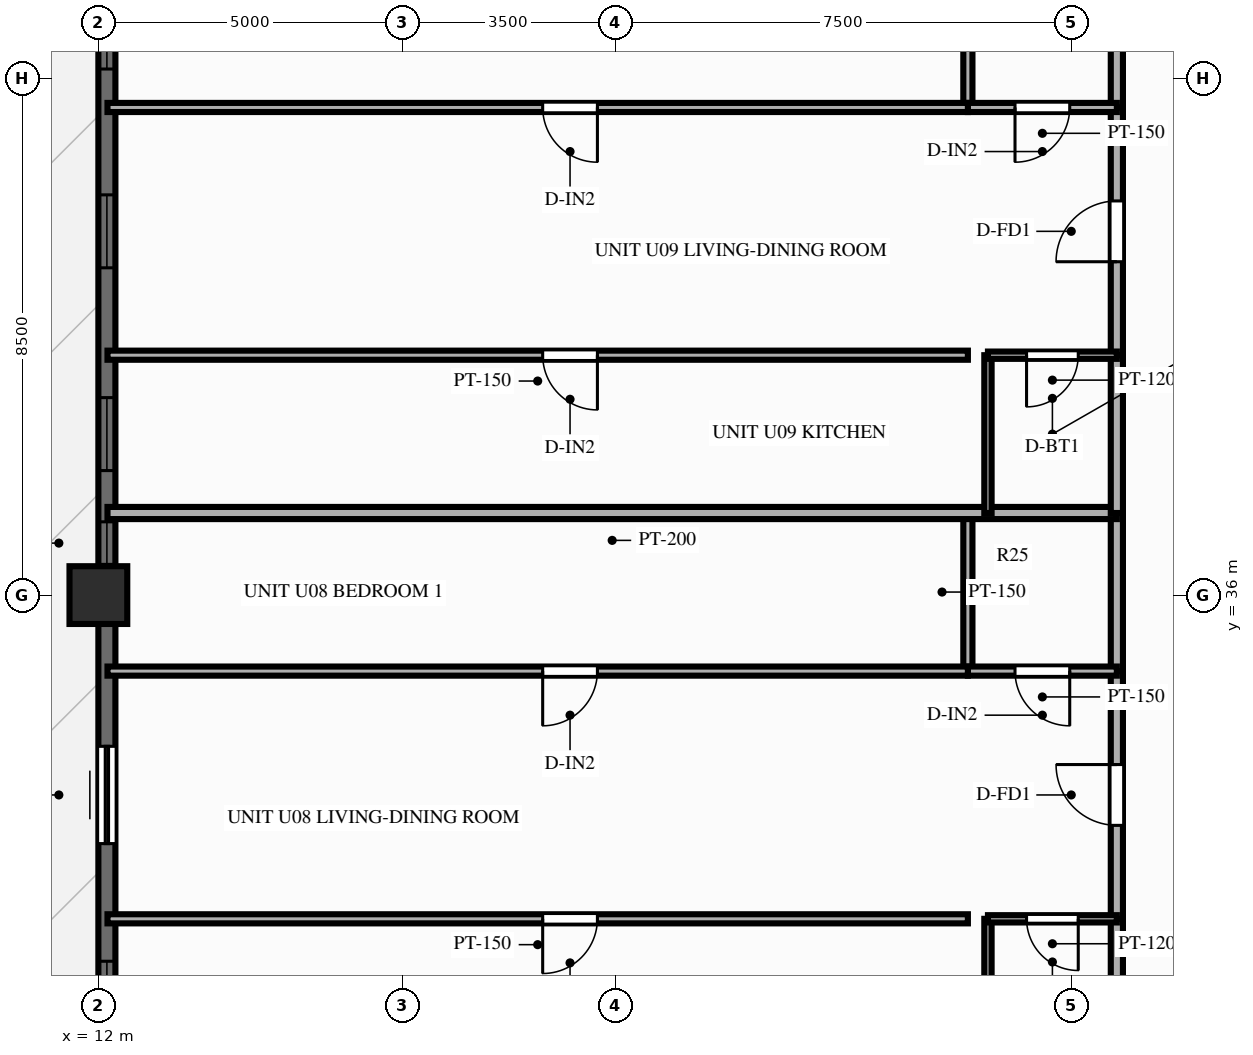
"""IFC4 building model, lengths in metres.
Left out: names, types, materials, properties, quantities, classifications, styles, units other than length and angle.
Written with IfcOpenShell. Run it as: python <this file> out.ifc"""

import sys

from ifc_helpers import new_model, si_unit, direction, frame, frame_2d, origin, origin_2d, place, context, subcontext, project, spatial, rectangle, extrude, source, transform, mapped, element, fill, save


model = new_model("IFC4")
c1 = context("Model", 3, precision=1e-05, world=origin(), true_north=direction((0.0, 1.0)))
c2 = subcontext(c1, "Body", "Model", "MODEL_VIEW")
j1 = project(units=[si_unit("LENGTHUNIT", "METRE"), si_unit("PLANEANGLEUNIT", "RADIAN")], contexts=[c1])
p1 = place(None, origin())
s1 = spatial("IfcSite", under=j1, at=p1, CompositionType="ELEMENT")
p2 = place(p1, origin())
s2 = spatial("IfcBuilding", under=s1, at=p2, CompositionType="ELEMENT")
p3 = place(p2, frame((0.0, 0.0, 110.85)))
s3 = spatial("IfcBuildingStorey", under=s2, at=p3, CompositionType="ELEMENT", Elevation=110.85)
m1 = source(origin(), c2, "Body", "SweptSolid", [
    extrude(rectangle(XDim=0.95, YDim=0.95, at=origin_2d()), origin(), (0.0, 0.0, 1.0), 3.0),
])
p4 = place(p3, frame((12.0, 36.0, 0.0), z_axis=(0.0, 0.0, 1.0), x_axis=(1.0, 0.0, 0.0)))
e1 = element("IfcColumn", 1, at=p4, inside=s3, PredefinedType="COLUMN", context=c2, shape_type="MappedRepresentation", body=[
    mapped(m1, transform((0.0, 0.0, 0.0), scale=1.0)),
])
p5 = place(p3, frame((12.14, 7.2, 0.0), z_axis=(0.0, 0.0, 1.0), x_axis=(0.0, 1.0, 0.0)))
e2 = element("IfcWall", 2, at=p5, inside=s3, PredefinedType="SOLIDWALL", context=c2, shape_type="SweptSolid", body=[
    extrude(rectangle(XDim=39.6, YDim=0.28, at=frame_2d((19.8, 0.0))), origin(), (0.0, 0.0, 1.0), 2.28),
])
p6 = place(p5, frame((0.945, 0.0, 0.25)))
e3 = element("IfcOpeningElement", 3, at=p6, cuts=e2, PredefinedType="OPENING", context=c2, shape_type="SweptSolid", body=[
    extrude(rectangle(XDim=1.2, YDim=1.5, at=frame_2d((0.6, 0.75))), frame((0.0, 0.152, 0.0), z_axis=(0.0, -1.0, 0.0), x_axis=(1.0, 0.0, 0.0)), (0.0, 0.0, 1.0), 0.304),
])
p7 = place(p5, frame((4.213, 0.0, 0.25)))
e4 = element("IfcOpeningElement", 4, at=p7, cuts=e2, PredefinedType="OPENING", context=c2, shape_type="SweptSolid", body=[
    extrude(rectangle(XDim=1.2, YDim=1.5, at=frame_2d((0.6, 0.75))), frame((0.0, 0.152, 0.0), z_axis=(0.0, -1.0, 0.0), x_axis=(1.0, 0.0, 0.0)), (0.0, 0.0, 1.0), 0.304),
])
p8 = place(p5, frame((7.55, 0.0, 0.25)))
e5 = element("IfcOpeningElement", 5, at=p8, cuts=e2, PredefinedType="OPENING", context=c2, shape_type="SweptSolid", body=[
    extrude(rectangle(XDim=1.2, YDim=1.5, at=frame_2d((0.6, 0.75))), frame((0.0, 0.152, 0.0), z_axis=(0.0, -1.0, 0.0), x_axis=(1.0, 0.0, 0.0)), (0.0, 0.0, 1.0), 0.304),
])
p9 = place(p5, frame((13.483, 0.0, 0.25)))
e6 = element("IfcOpeningElement", 6, at=p9, cuts=e2, PredefinedType="OPENING", context=c2, shape_type="SweptSolid", body=[
    extrude(rectangle(XDim=1.2, YDim=1.5, at=frame_2d((0.6, 0.75))), frame((0.0, 0.152, 0.0), z_axis=(0.0, -1.0, 0.0), x_axis=(1.0, 0.0, 0.0)), (0.0, 0.0, 1.0), 0.304),
])
p10 = place(p5, frame((16.82, 0.0, 0.25)))
e7 = element("IfcOpeningElement", 7, at=p10, cuts=e2, PredefinedType="OPENING", context=c2, shape_type="SweptSolid", body=[
    extrude(rectangle(XDim=1.2, YDim=1.5, at=frame_2d((0.6, 0.75))), frame((0.0, 0.152, 0.0), z_axis=(0.0, -1.0, 0.0), x_axis=(1.0, 0.0, 0.0)), (0.0, 0.0, 1.0), 0.304),
])
p11 = place(p5, frame((19.2, 0.0, 0.25)))
e8 = element("IfcOpeningElement", 8, at=p11, cuts=e2, PredefinedType="OPENING", context=c2, shape_type="SweptSolid", body=[
    extrude(rectangle(XDim=1.2, YDim=1.5, at=frame_2d((0.6, 0.75))), frame((0.0, 0.152, 0.0), z_axis=(0.0, -1.0, 0.0), x_axis=(1.0, 0.0, 0.0)), (0.0, 0.0, 1.0), 0.304),
])
p12 = place(p5, frame((21.578, 0.0, 0.25)))
e9 = element("IfcOpeningElement", 9, at=p12, cuts=e2, PredefinedType="OPENING", context=c2, shape_type="SweptSolid", body=[
    extrude(rectangle(XDim=1.2, YDim=1.5, at=frame_2d((0.6, 0.75))), frame((0.0, 0.152, 0.0), z_axis=(0.0, -1.0, 0.0), x_axis=(1.0, 0.0, 0.0)), (0.0, 0.0, 1.0), 0.304),
])
p13 = place(p5, frame((24.713, 0.0, 0.0)))
e10 = element("IfcOpeningElement", 10, at=p13, cuts=e2, PredefinedType="OPENING", context=c2, shape_type="SweptSolid", body=[
    extrude(rectangle(XDim=1.6, YDim=2.15, at=frame_2d((0.8, 1.075))), frame((0.0, 0.152, 0.0), z_axis=(0.0, -1.0, 0.0), x_axis=(1.0, 0.0, 0.0)), (0.0, 0.0, 1.0), 0.304),
])
p14 = place(p5, frame((29.305, 0.0, 0.25)))
e11 = element("IfcOpeningElement", 11, at=p14, cuts=e2, PredefinedType="OPENING", context=c2, shape_type="SweptSolid", body=[
    extrude(rectangle(XDim=0.7, YDim=1.5, at=frame_2d((0.35, 0.75))), frame((0.0, 0.152, 0.0), z_axis=(0.0, -1.0, 0.0), x_axis=(1.0, 0.0, 0.0)), (0.0, 0.0, 1.0), 0.304),
])
p15 = place(p5, frame((30.848, 0.0, 0.25)))
e12 = element("IfcOpeningElement", 12, at=p15, cuts=e2, PredefinedType="OPENING", context=c2, shape_type="SweptSolid", body=[
    extrude(rectangle(XDim=1.2, YDim=1.5, at=frame_2d((0.6, 0.75))), frame((0.0, 0.152, 0.0), z_axis=(0.0, -1.0, 0.0), x_axis=(1.0, 0.0, 0.0)), (0.0, 0.0, 1.0), 0.304),
])
p16 = place(p5, frame((34.183, 0.0, 0.25)))
e13 = element("IfcOpeningElement", 13, at=p16, cuts=e2, PredefinedType="OPENING", context=c2, shape_type="SweptSolid", body=[
    extrude(rectangle(XDim=1.2, YDim=1.5, at=frame_2d((0.6, 0.75))), frame((0.0, 0.152, 0.0), z_axis=(0.0, -1.0, 0.0), x_axis=(1.0, 0.0, 0.0)), (0.0, 0.0, 1.0), 0.304),
])
p17 = place(p5, frame((37.452, 0.0, 0.25)))
e14 = element("IfcOpeningElement", 14, at=p17, cuts=e2, PredefinedType="OPENING", context=c2, shape_type="SweptSolid", body=[
    extrude(rectangle(XDim=1.2, YDim=1.5, at=frame_2d((0.6, 0.75))), frame((0.0, 0.152, 0.0), z_axis=(0.0, -1.0, 0.0), x_axis=(1.0, 0.0, 0.0)), (0.0, 0.0, 1.0), 0.304),
])
p18 = place(p3, frame((28.75, 28.08, 0.0), z_axis=(0.0, 0.0, 1.0), x_axis=(0.0, 1.0, 0.0)))
e15 = element("IfcWall", 15, at=p18, inside=s3, PredefinedType="PARTITIONING", context=c2, shape_type="SweptSolid", body=[
    extrude(rectangle(XDim=2.595, YDim=0.2, at=frame_2d((1.298, 0.0))), origin(), (0.0, 0.0, 1.0), 2.79),
])
p19 = place(p3, frame((28.75, 30.676, 0.0), z_axis=(0.0, 0.0, 1.0), x_axis=(0.0, 1.0, 0.0)))
e16 = element("IfcWall", 16, at=p19, inside=s3, PredefinedType="PARTITIONING", context=c2, shape_type="SweptSolid", body=[
    extrude(rectangle(XDim=4.074, YDim=0.2, at=frame_2d((2.037, 0.0))), origin(), (0.0, 0.0, 1.0), 2.79),
])
p20 = place(p19, frame((1.537, 0.0, 0.0)))
e17 = element("IfcOpeningElement", 17, at=p20, cuts=e16, PredefinedType="OPENING", context=c2, shape_type="SweptSolid", body=[
    extrude(rectangle(XDim=1.0, YDim=2.15, at=frame_2d((0.5, 1.075))), frame((0.0, 0.112, 0.0), z_axis=(0.0, -1.0, 0.0), x_axis=(1.0, 0.0, 0.0)), (0.0, 0.0, 1.0), 0.224),
])
p21 = place(p3, frame((28.75, 34.75, 0.0), z_axis=(0.0, 0.0, 1.0), x_axis=(0.0, 1.0, 0.0)))
e18 = element("IfcWall", 18, at=p21, inside=s3, PredefinedType="PARTITIONING", context=c2, shape_type="SweptSolid", body=[
    extrude(rectangle(XDim=2.6, YDim=0.2, at=frame_2d((1.3, 0.0))), origin(), (0.0, 0.0, 1.0), 2.79),
])
p22 = place(p3, frame((26.63, 28.08, 0.0), z_axis=(0.0, 0.0, 1.0), x_axis=(0.0, 1.0, 0.0)))
e19 = element("IfcWall", 19, at=p22, inside=s3, PredefinedType="PARTITIONING", context=c2, shape_type="SweptSolid", body=[
    extrude(rectangle(XDim=2.595, YDim=0.12, at=frame_2d((1.298, 0.0))), origin(), (0.0, 0.0, 1.0), 2.79),
])
p23 = place(p3, frame((26.3, 34.75, 0.0), z_axis=(0.0, 0.0, 1.0), x_axis=(0.0, 1.0, 0.0)))
e20 = element("IfcWall", 20, at=p23, inside=s3, PredefinedType="PARTITIONING", context=c2, shape_type="SweptSolid", body=[
    extrude(rectangle(XDim=2.6, YDim=0.15, at=frame_2d((1.3, 0.0))), origin(), (0.0, 0.0, 1.0), 2.79),
])
p24 = place(p3, frame((28.75, 30.676, 0.0), z_axis=(0.0, 0.0, 1.0), x_axis=(-1.0, 0.0, 0.0)))
e21 = element("IfcWall", 21, at=p24, inside=s3, PredefinedType="PARTITIONING", context=c2, shape_type="SweptSolid", body=[
    extrude(rectangle(XDim=2.12, YDim=0.12, at=frame_2d((1.06, 0.0))), origin(), (0.0, 0.0, 1.0), 2.79),
])
p25 = place(p24, frame((0.635, 0.0, 0.0)))
e22 = element("IfcOpeningElement", 22, at=p25, cuts=e21, PredefinedType="OPENING", context=c2, shape_type="SweptSolid", body=[
    extrude(rectangle(XDim=0.85, YDim=2.05, at=frame_2d((0.425, 1.025))), frame((0.0, 0.072, 0.0), z_axis=(0.0, -1.0, 0.0), x_axis=(1.0, 0.0, 0.0)), (0.0, 0.0, 1.0), 0.144),
])
p26 = place(p3, frame((26.3, 30.676, 0.0), z_axis=(0.0, 0.0, 1.0), x_axis=(-1.0, 0.0, 0.0)))
e23 = element("IfcWall", 23, at=p26, inside=s3, PredefinedType="PARTITIONING", context=c2, shape_type="SweptSolid", body=[
    extrude(rectangle(XDim=14.15, YDim=0.15, at=frame_2d((7.075, 0.0))), origin(), (0.0, 0.0, 1.0), 2.79),
])
p27 = place(p26, frame((6.093, 0.0, 0.0)))
e24 = element("IfcOpeningElement", 24, at=p27, cuts=e23, PredefinedType="OPENING", context=c2, shape_type="SweptSolid", body=[
    extrude(rectangle(XDim=0.9, YDim=2.1, at=frame_2d((0.45, 1.05))), frame((0.0, 0.087, 0.0), z_axis=(0.0, -1.0, 0.0), x_axis=(1.0, 0.0, 0.0)), (0.0, 0.0, 1.0), 0.174),
])
p28 = place(p3, frame((28.75, 34.75, 0.0), z_axis=(0.0, 0.0, 1.0), x_axis=(-1.0, 0.0, 0.0)))
e25 = element("IfcWall", 25, at=p28, inside=s3, PredefinedType="PARTITIONING", context=c2, shape_type="SweptSolid", body=[
    extrude(rectangle(XDim=2.45, YDim=0.15, at=frame_2d((1.225, 0.0))), origin(), (0.0, 0.0, 1.0), 2.79),
])
p29 = place(p28, frame((0.775, 0.0, 0.0)))
e26 = element("IfcOpeningElement", 26, at=p29, cuts=e25, PredefinedType="OPENING", context=c2, shape_type="SweptSolid", body=[
    extrude(rectangle(XDim=0.9, YDim=2.1, at=frame_2d((0.45, 1.05))), frame((0.0, 0.087, 0.0), z_axis=(0.0, -1.0, 0.0), x_axis=(1.0, 0.0, 0.0)), (0.0, 0.0, 1.0), 0.174),
])
p30 = place(p3, frame((26.3, 34.75, 0.0), z_axis=(0.0, 0.0, 1.0), x_axis=(-1.0, 0.0, 0.0)))
e27 = element("IfcWall", 27, at=p30, inside=s3, PredefinedType="PARTITIONING", context=c2, shape_type="SweptSolid", body=[
    extrude(rectangle(XDim=14.15, YDim=0.15, at=frame_2d((7.075, 0.0))), origin(), (0.0, 0.0, 1.0), 2.79),
])
p31 = place(p30, frame((6.093, 0.0, 0.0)))
e28 = element("IfcOpeningElement", 28, at=p31, cuts=e27, PredefinedType="OPENING", context=c2, shape_type="SweptSolid", body=[
    extrude(rectangle(XDim=0.9, YDim=2.1, at=frame_2d((0.45, 1.05))), frame((0.0, 0.087, 0.0), z_axis=(0.0, -1.0, 0.0), x_axis=(1.0, 0.0, 0.0)), (0.0, 0.0, 1.0), 0.174),
])
p32 = place(p3, frame((28.75, 37.35, 0.0), z_axis=(0.0, 0.0, 1.0), x_axis=(-1.0, 0.0, 0.0)))
e29 = element("IfcWall", 29, at=p32, inside=s3, PredefinedType="PARTITIONING", context=c2, shape_type="SweptSolid", body=[
    extrude(rectangle(XDim=16.6, YDim=0.2, at=frame_2d((8.3, 0.0))), origin(), (0.0, 0.0, 1.0), 2.79),
])
p33 = place(p3, frame((28.75, 37.35, 0.0), z_axis=(0.0, 0.0, 1.0), x_axis=(0.0, 1.0, 0.0)))
e30 = element("IfcWall", 30, at=p33, inside=s3, PredefinedType="PARTITIONING", context=c2, shape_type="SweptSolid", body=[
    extrude(rectangle(XDim=2.595, YDim=0.2, at=frame_2d((1.298, 0.0))), origin(), (0.0, 0.0, 1.0), 2.79),
])
p34 = place(p3, frame((28.75, 39.946, 0.0), z_axis=(0.0, 0.0, 1.0), x_axis=(0.0, 1.0, 0.0)))
e31 = element("IfcWall", 31, at=p34, inside=s3, PredefinedType="PARTITIONING", context=c2, shape_type="SweptSolid", body=[
    extrude(rectangle(XDim=4.074, YDim=0.2, at=frame_2d((2.037, 0.0))), origin(), (0.0, 0.0, 1.0), 2.79),
])
p35 = place(p34, frame((1.537, 0.0, 0.0)))
e32 = element("IfcOpeningElement", 32, at=p35, cuts=e31, PredefinedType="OPENING", context=c2, shape_type="SweptSolid", body=[
    extrude(rectangle(XDim=1.0, YDim=2.15, at=frame_2d((0.5, 1.075))), frame((0.0, 0.112, 0.0), z_axis=(0.0, -1.0, 0.0), x_axis=(1.0, 0.0, 0.0)), (0.0, 0.0, 1.0), 0.224),
])
p36 = place(p3, frame((28.75, 44.02, 0.0), z_axis=(0.0, 0.0, 1.0), x_axis=(0.0, 1.0, 0.0)))
e33 = element("IfcWall", 33, at=p36, inside=s3, PredefinedType="PARTITIONING", context=c2, shape_type="SweptSolid", body=[
    extrude(rectangle(XDim=2.6, YDim=0.2, at=frame_2d((1.3, 0.0))), origin(), (0.0, 0.0, 1.0), 2.79),
])
p37 = place(p3, frame((26.63, 37.35, 0.0), z_axis=(0.0, 0.0, 1.0), x_axis=(0.0, 1.0, 0.0)))
e34 = element("IfcWall", 34, at=p37, inside=s3, PredefinedType="PARTITIONING", context=c2, shape_type="SweptSolid", body=[
    extrude(rectangle(XDim=2.595, YDim=0.12, at=frame_2d((1.298, 0.0))), origin(), (0.0, 0.0, 1.0), 2.79),
])
p38 = place(p3, frame((26.3, 44.02, 0.0), z_axis=(0.0, 0.0, 1.0), x_axis=(0.0, 1.0, 0.0)))
e35 = element("IfcWall", 35, at=p38, inside=s3, PredefinedType="PARTITIONING", context=c2, shape_type="SweptSolid", body=[
    extrude(rectangle(XDim=2.6, YDim=0.15, at=frame_2d((1.3, 0.0))), origin(), (0.0, 0.0, 1.0), 2.79),
])
p39 = place(p3, frame((28.75, 39.946, 0.0), z_axis=(0.0, 0.0, 1.0), x_axis=(-1.0, 0.0, 0.0)))
e36 = element("IfcWall", 36, at=p39, inside=s3, PredefinedType="PARTITIONING", context=c2, shape_type="SweptSolid", body=[
    extrude(rectangle(XDim=2.12, YDim=0.12, at=frame_2d((1.06, 0.0))), origin(), (0.0, 0.0, 1.0), 2.79),
])
p40 = place(p39, frame((0.635, 0.0, 0.0)))
e37 = element("IfcOpeningElement", 37, at=p40, cuts=e36, PredefinedType="OPENING", context=c2, shape_type="SweptSolid", body=[
    extrude(rectangle(XDim=0.85, YDim=2.05, at=frame_2d((0.425, 1.025))), frame((0.0, 0.072, 0.0), z_axis=(0.0, -1.0, 0.0), x_axis=(1.0, 0.0, 0.0)), (0.0, 0.0, 1.0), 0.144),
])
p41 = place(p3, frame((26.3, 39.946, 0.0), z_axis=(0.0, 0.0, 1.0), x_axis=(-1.0, 0.0, 0.0)))
e38 = element("IfcWall", 38, at=p41, inside=s3, PredefinedType="PARTITIONING", context=c2, shape_type="SweptSolid", body=[
    extrude(rectangle(XDim=14.15, YDim=0.15, at=frame_2d((7.075, 0.0))), origin(), (0.0, 0.0, 1.0), 2.79),
])
p42 = place(p41, frame((6.093, 0.0, 0.0)))
e39 = element("IfcOpeningElement", 39, at=p42, cuts=e38, PredefinedType="OPENING", context=c2, shape_type="SweptSolid", body=[
    extrude(rectangle(XDim=0.9, YDim=2.1, at=frame_2d((0.45, 1.05))), frame((0.0, 0.087, 0.0), z_axis=(0.0, -1.0, 0.0), x_axis=(1.0, 0.0, 0.0)), (0.0, 0.0, 1.0), 0.174),
])
p43 = place(p3, frame((28.75, 44.02, 0.0), z_axis=(0.0, 0.0, 1.0), x_axis=(-1.0, 0.0, 0.0)))
e40 = element("IfcWall", 40, at=p43, inside=s3, PredefinedType="PARTITIONING", context=c2, shape_type="SweptSolid", body=[
    extrude(rectangle(XDim=2.45, YDim=0.15, at=frame_2d((1.225, 0.0))), origin(), (0.0, 0.0, 1.0), 2.79),
])
p44 = place(p43, frame((0.775, 0.0, 0.0)))
e41 = element("IfcOpeningElement", 41, at=p44, cuts=e40, PredefinedType="OPENING", context=c2, shape_type="SweptSolid", body=[
    extrude(rectangle(XDim=0.9, YDim=2.1, at=frame_2d((0.45, 1.05))), frame((0.0, 0.087, 0.0), z_axis=(0.0, -1.0, 0.0), x_axis=(1.0, 0.0, 0.0)), (0.0, 0.0, 1.0), 0.174),
])
p45 = place(p3, frame((26.3, 44.02, 0.0), z_axis=(0.0, 0.0, 1.0), x_axis=(-1.0, 0.0, 0.0)))
e42 = element("IfcWall", 42, at=p45, inside=s3, PredefinedType="PARTITIONING", context=c2, shape_type="SweptSolid", body=[
    extrude(rectangle(XDim=14.15, YDim=0.15, at=frame_2d((7.075, 0.0))), origin(), (0.0, 0.0, 1.0), 2.79),
])
p46 = place(p45, frame((6.093, 0.0, 0.0)))
e43 = element("IfcOpeningElement", 43, at=p46, cuts=e42, PredefinedType="OPENING", context=c2, shape_type="SweptSolid", body=[
    extrude(rectangle(XDim=0.9, YDim=2.1, at=frame_2d((0.45, 1.05))), frame((0.0, 0.087, 0.0), z_axis=(0.0, -1.0, 0.0), x_axis=(1.0, 0.0, 0.0)), (0.0, 0.0, 1.0), 0.174),
])
m2 = source(origin(), c2, "Body", "SweptSolid", [
    extrude(rectangle(XDim=1.2, YDim=1.5, at=frame_2d((0.6, 0.75))), frame((0.0, 0.03, 0.0), z_axis=(0.0, -1.0, 0.0), x_axis=(1.0, 0.0, 0.0)), (0.0, 0.0, 1.0), 0.06),
])
p47 = place(p12, origin())
e44 = element("IfcWindow", 44, at=p47, inside=s3, PartitioningType="SINGLE_PANEL", PredefinedType="WINDOW", context=c2, shape_type="MappedRepresentation", body=[
    mapped(m2, transform((0.0, 0.0, 0.0), scale=1.0)),
])
fill(e9, e44)
m3 = source(origin(), c2, "Body", "SweptSolid", [
    extrude(rectangle(XDim=1.6, YDim=2.15, at=frame_2d((0.8, 1.075))), frame((0.0, 0.025, 0.0), z_axis=(0.0, -1.0, 0.0), x_axis=(1.0, 0.0, 0.0)), (0.0, 0.0, 1.0), 0.05),
])
p48 = place(p13, origin())
e45 = element("IfcDoor", 45, at=p48, inside=s3, OperationType="SLIDING_TO_LEFT", PredefinedType="DOOR", context=c2, shape_type="MappedRepresentation", body=[
    mapped(m3, transform((0.0, 0.0, 0.0), scale=1.0)),
])
fill(e10, e45)
m4 = source(origin(), c2, "Body", "SweptSolid", [
    extrude(rectangle(XDim=0.7, YDim=1.5, at=frame_2d((0.35, 0.75))), frame((0.0, 0.03, 0.0), z_axis=(0.0, -1.0, 0.0), x_axis=(1.0, 0.0, 0.0)), (0.0, 0.0, 1.0), 0.06),
])
p49 = place(p14, origin())
e46 = element("IfcWindow", 46, at=p49, inside=s3, PartitioningType="SINGLE_PANEL", PredefinedType="WINDOW", context=c2, shape_type="MappedRepresentation", body=[
    mapped(m4, transform((0.0, 0.0, 0.0), scale=1.0)),
])
fill(e11, e46)
p50 = place(p15, origin())
e47 = element("IfcWindow", 47, at=p50, inside=s3, PartitioningType="SINGLE_PANEL", PredefinedType="WINDOW", context=c2, shape_type="MappedRepresentation", body=[
    mapped(m2, transform((0.0, 0.0, 0.0), scale=1.0)),
])
fill(e12, e47)
p51 = place(p16, origin())
e48 = element("IfcWindow", 48, at=p51, inside=s3, PartitioningType="SINGLE_PANEL", PredefinedType="WINDOW", context=c2, shape_type="MappedRepresentation", body=[
    mapped(m2, transform((0.0, 0.0, 0.0), scale=1.0)),
])
fill(e13, e48)
p52 = place(p17, origin())
e49 = element("IfcWindow", 49, at=p52, inside=s3, PartitioningType="SINGLE_PANEL", PredefinedType="WINDOW", context=c2, shape_type="MappedRepresentation", body=[
    mapped(m2, transform((0.0, 0.0, 0.0), scale=1.0)),
])
fill(e14, e49)
m5 = source(origin(), c2, "Body", "SweptSolid", [
    extrude(rectangle(XDim=1.0, YDim=2.15, at=frame_2d((0.5, 1.075))), frame((0.0, 0.025, 0.0), z_axis=(0.0, -1.0, 0.0), x_axis=(1.0, 0.0, 0.0)), (0.0, 0.0, 1.0), 0.05),
])
p53 = place(p20, origin())
e50 = element("IfcDoor", 50, at=p53, inside=s3, OperationType="SINGLE_SWING_RIGHT", PredefinedType="DOOR", context=c2, shape_type="MappedRepresentation", body=[
    mapped(m5, transform((0.0, 0.0, 0.0), scale=1.0)),
])
fill(e17, e50)
m6 = source(origin(), c2, "Body", "SweptSolid", [
    extrude(rectangle(XDim=0.85, YDim=2.05, at=frame_2d((0.425, 1.025))), frame((0.0, 0.025, 0.0), z_axis=(0.0, -1.0, 0.0), x_axis=(1.0, 0.0, 0.0)), (0.0, 0.0, 1.0), 0.05),
])
p54 = place(p25, origin())
e51 = element("IfcDoor", 51, at=p54, inside=s3, OperationType="SINGLE_SWING_LEFT", PredefinedType="DOOR", context=c2, shape_type="MappedRepresentation", body=[
    mapped(m6, transform((0.0, 0.0, 0.0), scale=1.0)),
])
fill(e22, e51)
m7 = source(origin(), c2, "Body", "SweptSolid", [
    extrude(rectangle(XDim=0.9, YDim=2.1, at=frame_2d((0.45, 1.05))), frame((0.0, 0.025, 0.0), z_axis=(0.0, -1.0, 0.0), x_axis=(1.0, 0.0, 0.0)), (0.0, 0.0, 1.0), 0.05),
])
p55 = place(p27, origin())
e52 = element("IfcDoor", 52, at=p55, inside=s3, OperationType="SINGLE_SWING_RIGHT", PredefinedType="DOOR", context=c2, shape_type="MappedRepresentation", body=[
    mapped(m7, transform((0.0, 0.0, 0.0), scale=1.0)),
])
fill(e24, e52)
p56 = place(p29, origin())
e53 = element("IfcDoor", 53, at=p56, inside=s3, OperationType="SINGLE_SWING_LEFT", PredefinedType="DOOR", context=c2, shape_type="MappedRepresentation", body=[
    mapped(m7, transform((0.0, 0.0, 0.0), scale=1.0)),
])
fill(e26, e53)
p57 = place(p31, origin())
e54 = element("IfcDoor", 54, at=p57, inside=s3, OperationType="SINGLE_SWING_RIGHT", PredefinedType="DOOR", context=c2, shape_type="MappedRepresentation", body=[
    mapped(m7, transform((0.0, 0.0, 0.0), scale=1.0)),
])
fill(e28, e54)
p58 = place(p35, origin())
e55 = element("IfcDoor", 55, at=p58, inside=s3, OperationType="SINGLE_SWING_LEFT", PredefinedType="DOOR", context=c2, shape_type="MappedRepresentation", body=[
    mapped(m5, transform((0.0, 0.0, 0.0), scale=1.0)),
])
fill(e32, e55)
p59 = place(p40, origin())
e56 = element("IfcDoor", 56, at=p59, inside=s3, OperationType="SINGLE_SWING_RIGHT", PredefinedType="DOOR", context=c2, shape_type="MappedRepresentation", body=[
    mapped(m6, transform((0.0, 0.0, 0.0), scale=1.0)),
])
fill(e37, e56)
p60 = place(p42, origin())
e57 = element("IfcDoor", 57, at=p60, inside=s3, OperationType="SINGLE_SWING_LEFT", PredefinedType="DOOR", context=c2, shape_type="MappedRepresentation", body=[
    mapped(m7, transform((0.0, 0.0, 0.0), scale=1.0)),
])
fill(e39, e57)
p61 = place(p44, origin())
e58 = element("IfcDoor", 58, at=p61, inside=s3, OperationType="SINGLE_SWING_RIGHT", PredefinedType="DOOR", context=c2, shape_type="MappedRepresentation", body=[
    mapped(m7, transform((0.0, 0.0, 0.0), scale=1.0)),
])
fill(e41, e58)
p62 = place(p46, origin())
e59 = element("IfcDoor", 59, at=p62, inside=s3, OperationType="SINGLE_SWING_LEFT", PredefinedType="DOOR", context=c2, shape_type="MappedRepresentation", body=[
    mapped(m7, transform((0.0, 0.0, 0.0), scale=1.0)),
])
fill(e43, e59)
save(model, sys.argv[1])
